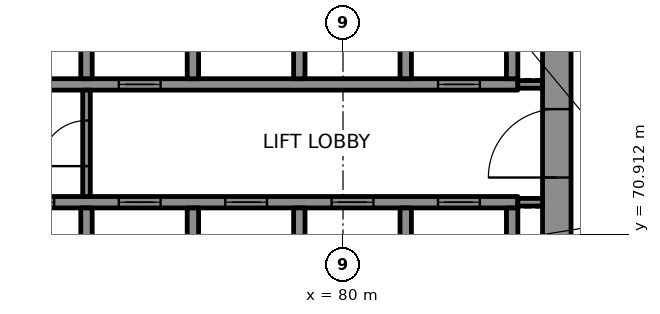
"""IFC4 building model, lengths in metres.
Left out: names, types, materials, properties, quantities, classifications, styles, units other than length and angle.
Written with IfcOpenShell. Run it as: python <this file> out.ifc"""

import sys

from ifc_helpers import new_model, si_unit, direction, frame, frame_2d, origin, place, context, subcontext, project, spatial, rectangle, extrude, element, fill, save


model = new_model("IFC4")
c1 = context("Model", 3, precision=1e-05, world=origin(), true_north=direction((0.0, 1.0)))
c2 = subcontext(c1, "Body", "Model", "MODEL_VIEW")
j1 = project(units=[si_unit("LENGTHUNIT", "METRE"), si_unit("PLANEANGLEUNIT", "RADIAN")], contexts=[c1])
p1 = place(None, origin())
s1 = spatial("IfcSite", under=j1, at=p1, CompositionType="ELEMENT")
p2 = place(p1, origin())
s2 = spatial("IfcBuilding", under=s1, at=p2, CompositionType="ELEMENT")
p3 = place(p2, frame((0.0, 0.0, 167.5)))
s3 = spatial("IfcBuildingStorey", under=s2, at=p3, CompositionType="ELEMENT", Elevation=167.5)
p4 = place(p3, frame((85.625, 67.75, 0.0), z_axis=(0.0, 0.0, 1.0), x_axis=(0.0, 1.0, 0.0)))
e1 = element("IfcWall", 1, at=p4, inside=s3, PredefinedType="SHEAR", context=c2, shape_type="SweptSolid", body=[
    extrude(rectangle(XDim=14.5, YDim=0.75, at=frame_2d((7.25, 0.0))), origin(), (0.0, 0.0, 1.0), 3.7),
])
p5 = place(p4, frame((4.65, 0.0, 0.0)))
e2 = element("IfcOpeningElement", 2, at=p5, cuts=e1, PredefinedType="OPENING", context=c2, shape_type="SweptSolid", body=[
    extrude(rectangle(XDim=1.8, YDim=2.1, at=frame_2d((0.9, 1.05))), frame((0.0, 0.385, 0.0), z_axis=(0.0, -1.0, 0.0), x_axis=(1.0, 0.0, 0.0)), (0.0, 0.0, 1.0), 0.77),
])
p6 = place(p4, frame((11.8, 0.0, 0.0)))
e3 = element("IfcOpeningElement", 3, at=p6, cuts=e1, PredefinedType="OPENING", context=c2, shape_type="SweptSolid", body=[
    extrude(rectangle(XDim=0.9, YDim=2.1, at=frame_2d((0.45, 1.05))), frame((0.0, 0.385, 0.0), z_axis=(0.0, -1.0, 0.0), x_axis=(1.0, 0.0, 0.0)), (0.0, 0.0, 1.0), 0.77),
])
p7 = place(p3, frame((70.3, 71.75, 0.0), z_axis=(0.0, 0.0, 1.0), x_axis=(1.0, 0.0, 0.0)))
e4 = element("IfcWall", 4, at=p7, inside=s3, PredefinedType="SHEAR", context=c2, shape_type="SweptSolid", body=[
    extrude(rectangle(XDim=14.3, YDim=0.3, at=frame_2d((7.15, 0.0))), origin(), (0.0, 0.0, 1.0), 3.7),
])
p8 = place(p7, frame((1.0, 0.0, 0.0)))
e5 = element("IfcOpeningElement", 5, at=p8, cuts=e4, PredefinedType="OPENING", context=c2, shape_type="SweptSolid", body=[
    extrude(rectangle(XDim=1.1, YDim=2.1, at=frame_2d((0.55, 1.05))), frame((0.0, 0.16, 0.0), z_axis=(0.0, -1.0, 0.0), x_axis=(1.0, 0.0, 0.0)), (0.0, 0.0, 1.0), 0.32),
])
p9 = place(p7, frame((3.8, 0.0, 0.0)))
e6 = element("IfcOpeningElement", 6, at=p9, cuts=e4, PredefinedType="OPENING", context=c2, shape_type="SweptSolid", body=[
    extrude(rectangle(XDim=1.1, YDim=2.1, at=frame_2d((0.55, 1.05))), frame((0.0, 0.16, 0.0), z_axis=(0.0, -1.0, 0.0), x_axis=(1.0, 0.0, 0.0)), (0.0, 0.0, 1.0), 0.32),
])
p10 = place(p7, frame((6.6, 0.0, 0.0)))
e7 = element("IfcOpeningElement", 7, at=p10, cuts=e4, PredefinedType="OPENING", context=c2, shape_type="SweptSolid", body=[
    extrude(rectangle(XDim=1.1, YDim=2.1, at=frame_2d((0.55, 1.05))), frame((0.0, 0.16, 0.0), z_axis=(0.0, -1.0, 0.0), x_axis=(1.0, 0.0, 0.0)), (0.0, 0.0, 1.0), 0.32),
])
p11 = place(p7, frame((9.4, 0.0, 0.0)))
e8 = element("IfcOpeningElement", 8, at=p11, cuts=e4, PredefinedType="OPENING", context=c2, shape_type="SweptSolid", body=[
    extrude(rectangle(XDim=1.1, YDim=2.1, at=frame_2d((0.55, 1.05))), frame((0.0, 0.16, 0.0), z_axis=(0.0, -1.0, 0.0), x_axis=(1.0, 0.0, 0.0)), (0.0, 0.0, 1.0), 0.32),
])
p12 = place(p7, frame((12.2, 0.0, 0.0)))
e9 = element("IfcOpeningElement", 9, at=p12, cuts=e4, PredefinedType="OPENING", context=c2, shape_type="SweptSolid", body=[
    extrude(rectangle(XDim=1.1, YDim=2.1, at=frame_2d((0.55, 1.05))), frame((0.0, 0.16, 0.0), z_axis=(0.0, -1.0, 0.0), x_axis=(1.0, 0.0, 0.0)), (0.0, 0.0, 1.0), 0.32),
])
p13 = place(p3, frame((70.3, 74.85, 0.0), z_axis=(0.0, 0.0, 1.0), x_axis=(1.0, 0.0, 0.0)))
e10 = element("IfcWall", 10, at=p13, inside=s3, PredefinedType="SHEAR", context=c2, shape_type="SweptSolid", body=[
    extrude(rectangle(XDim=14.3, YDim=0.3, at=frame_2d((7.15, 0.0))), origin(), (0.0, 0.0, 1.0), 3.7),
])
p14 = place(p13, frame((3.8, 0.0, 0.0)))
e11 = element("IfcOpeningElement", 11, at=p14, cuts=e10, PredefinedType="OPENING", context=c2, shape_type="SweptSolid", body=[
    extrude(rectangle(XDim=1.1, YDim=2.1, at=frame_2d((0.55, 1.05))), frame((0.0, 0.16, 0.0), z_axis=(0.0, -1.0, 0.0), x_axis=(1.0, 0.0, 0.0)), (0.0, 0.0, 1.0), 0.32),
])
p15 = place(p13, frame((12.2, 0.0, 0.0)))
e12 = element("IfcOpeningElement", 12, at=p15, cuts=e10, PredefinedType="OPENING", context=c2, shape_type="SweptSolid", body=[
    extrude(rectangle(XDim=1.1, YDim=2.1, at=frame_2d((0.55, 1.05))), frame((0.0, 0.16, 0.0), z_axis=(0.0, -1.0, 0.0), x_axis=(1.0, 0.0, 0.0)), (0.0, 0.0, 1.0), 0.32),
])
for number, where, z_axis, x_axis in (
    (13, (73.25, 69.0, 0.0), (0.0, 0.0, 1.0), (0.0, 1.0, 0.0)),
    (14, (73.25, 75.0, 0.0), (0.0, 0.0, 1.0), (0.0, 1.0, 0.0)),
    (15, (76.05, 69.0, 0.0), (0.0, 0.0, 1.0), (0.0, 1.0, 0.0)),
    (16, (76.05, 75.0, 0.0), (0.0, 0.0, 1.0), (0.0, 1.0, 0.0)),
    (17, (78.85, 69.0, 0.0), (0.0, 0.0, 1.0), (0.0, 1.0, 0.0)),
    (18, (78.85, 75.0, 0.0), (0.0, 0.0, 1.0), (0.0, 1.0, 0.0)),
    (19, (81.65, 69.0, 0.0), (0.0, 0.0, 1.0), (0.0, 1.0, 0.0)),
    (20, (81.65, 75.0, 0.0), (0.0, 0.0, 1.0), (0.0, 1.0, 0.0)),
    (21, (84.45, 69.0, 0.0), (0.0, 0.0, 1.0), (0.0, 1.0, 0.0)),
    (22, (84.45, 75.0, 0.0), (0.0, 0.0, 1.0), (0.0, 1.0, 0.0)),
):
    element("IfcWall", number, at=place(p3, frame(where, z_axis=z_axis, x_axis=x_axis)), inside=s3, PredefinedType="SHEAR", context=c2, shape_type="SweptSolid", body=[
        extrude(rectangle(XDim=2.6, YDim=0.3, at=frame_2d((1.3, 0.0))), origin(), (0.0, 0.0, 1.0), 3.7),
    ])
for number, where, z_axis, x_axis in (
    (23, (84.6, 71.75, 0.0), (0.0, 0.0, 1.0), (1.0, 0.0, 0.0)),
    (24, (84.6, 74.85, 0.0), (0.0, 0.0, 1.0), (1.0, 0.0, 0.0)),
):
    element("IfcWall", number, at=place(p3, frame(where, z_axis=z_axis, x_axis=x_axis)), inside=s3, PredefinedType="PARTITIONING", context=c2, shape_type="SweptSolid", body=[
        extrude(rectangle(XDim=0.65, YDim=0.2, at=frame_2d((0.325, 0.0))), origin(), (0.0, 0.0, 1.0), 3.7),
    ])
p16 = place(p3, frame((73.25, 71.9, 0.0), z_axis=(0.0, 0.0, 1.0), x_axis=(0.0, 1.0, 0.0)))
e25 = element("IfcWall", 25, at=p16, inside=s3, PredefinedType="PARTITIONING", context=c2, shape_type="SweptSolid", body=[
    extrude(rectangle(XDim=2.8, YDim=0.2, at=frame_2d((1.4, 0.0))), origin(), (0.0, 0.0, 1.0), 3.7),
])
p17 = place(p16, frame((0.8, 0.0, 0.0)))
e26 = element("IfcOpeningElement", 26, at=p17, cuts=e25, PredefinedType="OPENING", context=c2, shape_type="SweptSolid", body=[
    extrude(rectangle(XDim=1.2, YDim=2.1, at=frame_2d((0.6, 1.05))), frame((0.0, 0.11, 0.0), z_axis=(0.0, -1.0, 0.0), x_axis=(1.0, 0.0, 0.0)), (0.0, 0.0, 1.0), 0.22),
])
p18 = place(p8, origin())
e27 = element("IfcDoor", 27, at=p18, inside=s3, OperationType="DOUBLE_DOOR_SLIDING", PredefinedType="DOOR", context=c2, shape_type="SweptSolid", body=[
    extrude(rectangle(XDim=1.1, YDim=2.1, at=frame_2d((0.55, 1.05))), frame((0.0, 0.025, 0.0), z_axis=(0.0, -1.0, 0.0), x_axis=(1.0, 0.0, 0.0)), (0.0, 0.0, 1.0), 0.05),
])
fill(e5, e27)
p19 = place(p9, origin())
e28 = element("IfcDoor", 28, at=p19, inside=s3, OperationType="DOUBLE_DOOR_SLIDING", PredefinedType="DOOR", context=c2, shape_type="SweptSolid", body=[
    extrude(rectangle(XDim=1.1, YDim=2.1, at=frame_2d((0.55, 1.05))), frame((0.0, 0.025, 0.0), z_axis=(0.0, -1.0, 0.0), x_axis=(1.0, 0.0, 0.0)), (0.0, 0.0, 1.0), 0.05),
])
fill(e6, e28)
p20 = place(p10, origin())
e29 = element("IfcDoor", 29, at=p20, inside=s3, OperationType="DOUBLE_DOOR_SLIDING", PredefinedType="DOOR", context=c2, shape_type="SweptSolid", body=[
    extrude(rectangle(XDim=1.1, YDim=2.1, at=frame_2d((0.55, 1.05))), frame((0.0, 0.025, 0.0), z_axis=(0.0, -1.0, 0.0), x_axis=(1.0, 0.0, 0.0)), (0.0, 0.0, 1.0), 0.05),
])
fill(e7, e29)
p21 = place(p11, origin())
e30 = element("IfcDoor", 30, at=p21, inside=s3, OperationType="DOUBLE_DOOR_SLIDING", PredefinedType="DOOR", context=c2, shape_type="SweptSolid", body=[
    extrude(rectangle(XDim=1.1, YDim=2.1, at=frame_2d((0.55, 1.05))), frame((0.0, 0.025, 0.0), z_axis=(0.0, -1.0, 0.0), x_axis=(1.0, 0.0, 0.0)), (0.0, 0.0, 1.0), 0.05),
])
fill(e8, e30)
p22 = place(p12, origin())
e31 = element("IfcDoor", 31, at=p22, inside=s3, OperationType="DOUBLE_DOOR_SLIDING", PredefinedType="DOOR", context=c2, shape_type="SweptSolid", body=[
    extrude(rectangle(XDim=1.1, YDim=2.1, at=frame_2d((0.55, 1.05))), frame((0.0, 0.025, 0.0), z_axis=(0.0, -1.0, 0.0), x_axis=(1.0, 0.0, 0.0)), (0.0, 0.0, 1.0), 0.05),
])
fill(e9, e31)
p23 = place(p14, origin())
e32 = element("IfcDoor", 32, at=p23, inside=s3, OperationType="DOUBLE_DOOR_SLIDING", PredefinedType="DOOR", context=c2, shape_type="SweptSolid", body=[
    extrude(rectangle(XDim=1.1, YDim=2.1, at=frame_2d((0.55, 1.05))), frame((0.0, 0.025, 0.0), z_axis=(0.0, -1.0, 0.0), x_axis=(1.0, 0.0, 0.0)), (0.0, 0.0, 1.0), 0.05),
])
fill(e11, e32)
p24 = place(p15, origin())
e33 = element("IfcDoor", 33, at=p24, inside=s3, OperationType="DOUBLE_DOOR_SLIDING", PredefinedType="DOOR", context=c2, shape_type="SweptSolid", body=[
    extrude(rectangle(XDim=1.1, YDim=2.1, at=frame_2d((0.55, 1.05))), frame((0.0, 0.025, 0.0), z_axis=(0.0, -1.0, 0.0), x_axis=(1.0, 0.0, 0.0)), (0.0, 0.0, 1.0), 0.05),
])
fill(e12, e33)
p25 = place(p17, origin())
e34 = element("IfcDoor", 34, at=p25, inside=s3, OperationType="SINGLE_SWING_LEFT", PredefinedType="DOOR", context=c2, shape_type="SweptSolid", body=[
    extrude(rectangle(XDim=1.2, YDim=2.1, at=frame_2d((0.6, 1.05))), frame((0.0, 0.025, 0.0), z_axis=(0.0, -1.0, 0.0), x_axis=(1.0, 0.0, 0.0)), (0.0, 0.0, 1.0), 0.05),
])
fill(e26, e34)
p26 = place(p5, origin())
e35 = element("IfcDoor", 35, at=p26, inside=s3, OperationType="SINGLE_SWING_RIGHT", PredefinedType="DOOR", context=c2, shape_type="SweptSolid", body=[
    extrude(rectangle(XDim=1.8, YDim=2.1, at=frame_2d((0.9, 1.05))), frame((0.0, 0.095, 0.0), z_axis=(0.0, -1.0, 0.0), x_axis=(1.0, 0.0, 0.0)), (0.0, 0.0, 1.0), 0.19),
])
fill(e2, e35)
save(model, sys.argv[1])
